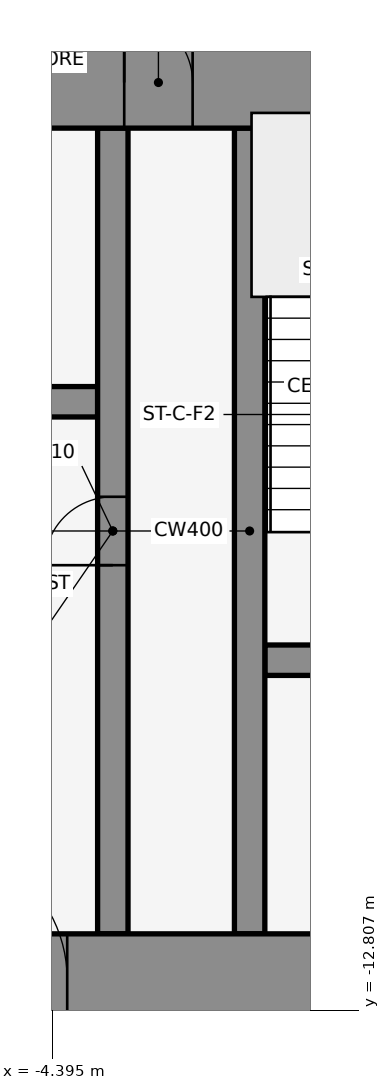
"""IFC4 building model, lengths in metres.
Left out: names, types, materials, properties, quantities, classifications, styles, units other than length and angle.
Written with IfcOpenShell. Run it as: python <this file> out.ifc"""

import sys

from ifc_helpers import new_model, si_unit, direction, frame, frame_2d, origin, place, context, subcontext, project, spatial, rectangle, extrude, element, fill, save


model = new_model("IFC4")
c1 = context("Model", 3, precision=1e-05, world=origin(), true_north=direction((0.0, 1.0)))
c2 = subcontext(c1, "Body", "Model", "MODEL_VIEW")
j1 = project(units=[si_unit("LENGTHUNIT", "METRE"), si_unit("PLANEANGLEUNIT", "RADIAN")], contexts=[c1])
p1 = place(None, origin())
s1 = spatial("IfcSite", under=j1, at=p1, CompositionType="ELEMENT")
p2 = place(p1, origin())
s2 = spatial("IfcBuilding", under=s1, at=p2, CompositionType="ELEMENT")
p3 = place(p2, frame((0.0, 0.0, 266.6)))
s3 = spatial("IfcBuildingStorey", under=s2, at=p3, CompositionType="ELEMENT", Elevation=266.6)
p4 = place(p3, frame((-0.068, -0.105, 0.0), z_axis=(0.0, 0.0, 1.0), x_axis=(-0.83981312244, 0.542875602121, 0.0)))
e1 = element("IfcWall", 1, at=p4, inside=s3, PredefinedType="STANDARD", context=c2, shape_type="SweptSolid", body=[
    extrude(rectangle(XDim=2.183, YDim=0.25, at=frame_2d((1.091, 0.0))), origin(), (0.0, 0.0, 1.0), 4.05),
])
p5 = place(p3, frame((-1.6, -8.2, 0.0), z_axis=(0.0, 0.0, 1.0), x_axis=(1.0, 0.0, 0.0)))
e2 = element("IfcWall", 2, at=p5, inside=s3, PredefinedType="SHEAR", context=c2, shape_type="SweptSolid", body=[
    extrude(rectangle(XDim=3.2, YDim=0.4, at=frame_2d((1.6, 0.0))), origin(), (0.0, 0.0, 1.0), 4.2),
])
p6 = place(p5, frame((1.05, 0.0, 0.0)))
e3 = element("IfcOpeningElement", 3, at=p6, cuts=e2, PredefinedType="OPENING", context=c2, shape_type="SweptSolid", body=[
    extrude(rectangle(XDim=1.2, YDim=2.1, at=frame_2d((0.6, 1.05))), frame((0.0, 0.212, 0.0), z_axis=(0.0, -1.0, 0.0), x_axis=(1.0, 0.0, 0.0)), (0.0, 0.0, 1.0), 0.424),
])
p7 = place(p3, frame((-17.4, -4.8, 0.0), z_axis=(0.0, 0.0, 1.0), x_axis=(1.0, 0.0, 0.0)))
e4 = element("IfcWall", 4, at=p7, inside=s3, PredefinedType="SHEAR", context=c2, shape_type="SweptSolid", body=[
    extrude(rectangle(XDim=13.6, YDim=0.4, at=frame_2d((6.8, 0.0))), origin(), (0.0, 0.0, 1.0), 4.2),
])
p8 = place(p7, frame((0.65, 0.0, 0.0)))
e5 = element("IfcOpeningElement", 5, at=p8, cuts=e4, PredefinedType="OPENING", context=c2, shape_type="SweptSolid", body=[
    extrude(rectangle(XDim=1.1, YDim=2.1, at=frame_2d((0.55, 1.05))), frame((0.0, 0.212, 0.0), z_axis=(0.0, -1.0, 0.0), x_axis=(1.0, 0.0, 0.0)), (0.0, 0.0, 1.0), 0.424),
])
p9 = place(p7, frame((2.95, 0.0, 0.0)))
e6 = element("IfcOpeningElement", 6, at=p9, cuts=e4, PredefinedType="OPENING", context=c2, shape_type="SweptSolid", body=[
    extrude(rectangle(XDim=1.1, YDim=2.1, at=frame_2d((0.55, 1.05))), frame((0.0, 0.212, 0.0), z_axis=(0.0, -1.0, 0.0), x_axis=(1.0, 0.0, 0.0)), (0.0, 0.0, 1.0), 0.424),
])
p10 = place(p7, frame((7.35, 0.0, 0.0)))
e7 = element("IfcOpeningElement", 7, at=p10, cuts=e4, PredefinedType="OPENING", context=c2, shape_type="SweptSolid", body=[
    extrude(rectangle(XDim=0.9, YDim=2.1, at=frame_2d((0.45, 1.05))), frame((0.0, 0.212, 0.0), z_axis=(0.0, -1.0, 0.0), x_axis=(1.0, 0.0, 0.0)), (0.0, 0.0, 1.0), 0.424),
])
p11 = place(p7, frame((11.75, 0.0, 0.0)))
e8 = element("IfcOpeningElement", 8, at=p11, cuts=e4, PredefinedType="OPENING", context=c2, shape_type="SweptSolid", body=[
    extrude(rectangle(XDim=0.9, YDim=2.1, at=frame_2d((0.45, 1.05))), frame((0.0, 0.212, 0.0), z_axis=(0.0, -1.0, 0.0), x_axis=(1.0, 0.0, 0.0)), (0.0, 0.0, 1.0), 0.424),
])
p12 = place(p3, frame((-3.6, -11.8, 0.0), z_axis=(0.0, 0.0, 1.0), x_axis=(0.0, 1.0, 0.0)))
e9 = element("IfcWall", 9, at=p12, inside=s3, PredefinedType="SHEAR", context=c2, shape_type="SweptSolid", body=[
    extrude(rectangle(XDim=10.6, YDim=0.4, at=frame_2d((5.3, 0.0))), origin(), (0.0, 0.0, 1.0), 4.2),
])
p13 = place(p12, frame((4.85, 0.0, 0.0)))
e10 = element("IfcOpeningElement", 10, at=p13, cuts=e9, PredefinedType="OPENING", context=c2, shape_type="SweptSolid", body=[
    extrude(rectangle(XDim=0.9, YDim=2.1, at=frame_2d((0.45, 1.05))), frame((0.0, 0.212, 0.0), z_axis=(0.0, -1.0, 0.0), x_axis=(1.0, 0.0, 0.0)), (0.0, 0.0, 1.0), 0.424),
])
p14 = place(p3, frame((-1.8, -11.8, 0.0), z_axis=(0.0, 0.0, 1.0), x_axis=(0.0, 1.0, 0.0)))
e11 = element("IfcWall", 11, at=p14, inside=s3, PredefinedType="SHEAR", context=c2, shape_type="SweptSolid", body=[
    extrude(rectangle(XDim=10.6, YDim=0.4, at=frame_2d((5.3, 0.0))), origin(), (0.0, 0.0, 1.0), 4.2),
])
p15 = place(p3, frame((-22.0, -0.6, 0.0), z_axis=(0.0, 0.0, 1.0), x_axis=(1.0, 0.0, 0.0)))
e12 = element("IfcWall", 12, at=p15, inside=s3, PredefinedType="SHEAR", context=c2, shape_type="SweptSolid", body=[
    extrude(rectangle(XDim=44.0, YDim=1.2, at=frame_2d((22.0, 0.0))), origin(), (0.0, 0.0, 1.0), 4.2),
])
p16 = place(p15, frame((18.55, 0.0, 0.0)))
e13 = element("IfcOpeningElement", 13, at=p16, cuts=e12, PredefinedType="OPENING", context=c2, shape_type="SweptSolid", body=[
    extrude(rectangle(XDim=0.9, YDim=2.1, at=frame_2d((0.45, 1.05))), frame((0.0, 0.612, 0.0), z_axis=(0.0, -1.0, 0.0), x_axis=(1.0, 0.0, 0.0)), (0.0, 0.0, 1.0), 1.224),
])
p17 = place(p15, frame((24.55, 0.0, 0.0)))
e14 = element("IfcOpeningElement", 14, at=p17, cuts=e12, PredefinedType="OPENING", context=c2, shape_type="SweptSolid", body=[
    extrude(rectangle(XDim=0.9, YDim=2.1, at=frame_2d((0.45, 1.05))), frame((0.0, 0.612, 0.0), z_axis=(0.0, -1.0, 0.0), x_axis=(1.0, 0.0, 0.0)), (0.0, 0.0, 1.0), 1.224),
])
p18 = place(p3, frame((-22.0, -12.4, 0.0), z_axis=(0.0, 0.0, 1.0), x_axis=(1.0, 0.0, 0.0)))
e15 = element("IfcWall", 15, at=p18, inside=s3, PredefinedType="SHEAR", context=c2, shape_type="SweptSolid", body=[
    extrude(rectangle(XDim=44.0, YDim=1.2, at=frame_2d((22.0, 0.0))), origin(), (0.0, 0.0, 1.0), 4.2),
])
p19 = place(p18, frame((2.2, 0.0, 0.0)))
e16 = element("IfcOpeningElement", 16, at=p19, cuts=e15, PredefinedType="OPENING", context=c2, shape_type="SweptSolid", body=[
    extrude(rectangle(XDim=1.2, YDim=2.1, at=frame_2d((0.6, 1.05))), frame((0.0, 0.612, 0.0), z_axis=(0.0, -1.0, 0.0), x_axis=(1.0, 0.0, 0.0)), (0.0, 0.0, 1.0), 1.224),
])
p20 = place(p18, frame((21.4, 0.0, 0.0)))
e17 = element("IfcOpeningElement", 17, at=p20, cuts=e15, PredefinedType="OPENING", context=c2, shape_type="SweptSolid", body=[
    extrude(rectangle(XDim=1.2, YDim=2.1, at=frame_2d((0.6, 1.05))), frame((0.0, 0.612, 0.0), z_axis=(0.0, -1.0, 0.0), x_axis=(1.0, 0.0, 0.0)), (0.0, 0.0, 1.0), 1.224),
])
p21 = place(p18, frame((40.6, 0.0, 0.0)))
e18 = element("IfcOpeningElement", 18, at=p21, cuts=e15, PredefinedType="OPENING", context=c2, shape_type="SweptSolid", body=[
    extrude(rectangle(XDim=1.2, YDim=2.1, at=frame_2d((0.6, 1.05))), frame((0.0, 0.612, 0.0), z_axis=(0.0, -1.0, 0.0), x_axis=(1.0, 0.0, 0.0)), (0.0, 0.0, 1.0), 1.224),
])
p22 = place(p18, frame((16.0, 0.0, 0.0)))
e19 = element("IfcOpeningElement", 19, at=p22, cuts=e15, PredefinedType="OPENING", context=c2, shape_type="SweptSolid", body=[
    extrude(rectangle(XDim=1.8, YDim=2.1, at=frame_2d((0.9, 1.05))), frame((0.0, 0.612, 0.0), z_axis=(0.0, -1.0, 0.0), x_axis=(1.0, 0.0, 0.0)), (0.0, 0.0, 1.0), 1.224),
])
p23 = place(p18, frame((6.3, 0.0, 0.0)))
e20 = element("IfcOpeningElement", 20, at=p23, cuts=e15, PredefinedType="OPENING", context=c2, shape_type="SweptSolid", body=[
    extrude(rectangle(XDim=1.2, YDim=2.1, at=frame_2d((0.6, 1.05))), frame((0.0, 0.612, 0.0), z_axis=(0.0, -1.0, 0.0), x_axis=(1.0, 0.0, 0.0)), (0.0, 0.0, 1.0), 1.224),
])
p24 = place(p18, frame((26.2, 0.0, 0.0)))
e21 = element("IfcOpeningElement", 21, at=p24, cuts=e15, PredefinedType="OPENING", context=c2, shape_type="SweptSolid", body=[
    extrude(rectangle(XDim=1.8, YDim=2.1, at=frame_2d((0.9, 1.05))), frame((0.0, 0.612, 0.0), z_axis=(0.0, -1.0, 0.0), x_axis=(1.0, 0.0, 0.0)), (0.0, 0.0, 1.0), 1.224),
])
p25 = place(p18, frame((36.5, 0.0, 0.0)))
e22 = element("IfcOpeningElement", 22, at=p25, cuts=e15, PredefinedType="OPENING", context=c2, shape_type="SweptSolid", body=[
    extrude(rectangle(XDim=1.2, YDim=2.1, at=frame_2d((0.6, 1.05))), frame((0.0, 0.612, 0.0), z_axis=(0.0, -1.0, 0.0), x_axis=(1.0, 0.0, 0.0)), (0.0, 0.0, 1.0), 1.224),
])
p26 = place(p13, frame((0.9, 0.0, 0.0), z_axis=(0.0, 0.0, 1.0), x_axis=(-1.0, 0.0, 0.0)))
e23 = element("IfcDoor", 23, at=p26, inside=s3, OperationType="SINGLE_SWING_LEFT", PredefinedType="DOOR", context=c2, shape_type="SweptSolid", body=[
    extrude(rectangle(XDim=0.9, YDim=2.1, at=frame_2d((0.45, 1.05))), frame((0.0, 0.025, 0.0), z_axis=(0.0, -1.0, 0.0), x_axis=(1.0, 0.0, 0.0)), (0.0, 0.0, 1.0), 0.05),
])
fill(e10, e23)
p27 = place(p16, origin())
e24 = element("IfcDoor", 24, at=p27, inside=s3, OperationType="SINGLE_SWING_LEFT", PredefinedType="DOOR", context=c2, shape_type="SweptSolid", body=[
    extrude(rectangle(XDim=0.9, YDim=2.1, at=frame_2d((0.45, 1.05))), frame((0.0, 0.025, 0.0), z_axis=(0.0, -1.0, 0.0), x_axis=(1.0, 0.0, 0.0)), (0.0, 0.0, 1.0), 0.05),
])
fill(e13, e24)
p28 = place(p22, origin())
e25 = element("IfcDoor", 25, at=p28, inside=s3, OperationType="SINGLE_SWING_LEFT", PredefinedType="DOOR", context=c2, shape_type="SweptSolid", body=[
    extrude(rectangle(XDim=1.8, YDim=2.1, at=frame_2d((0.9, 1.05))), frame((0.0, 0.025, 0.0), z_axis=(0.0, -1.0, 0.0), x_axis=(1.0, 0.0, 0.0)), (0.0, 0.0, 1.0), 0.05),
])
fill(e19, e25)
save(model, sys.argv[1])
